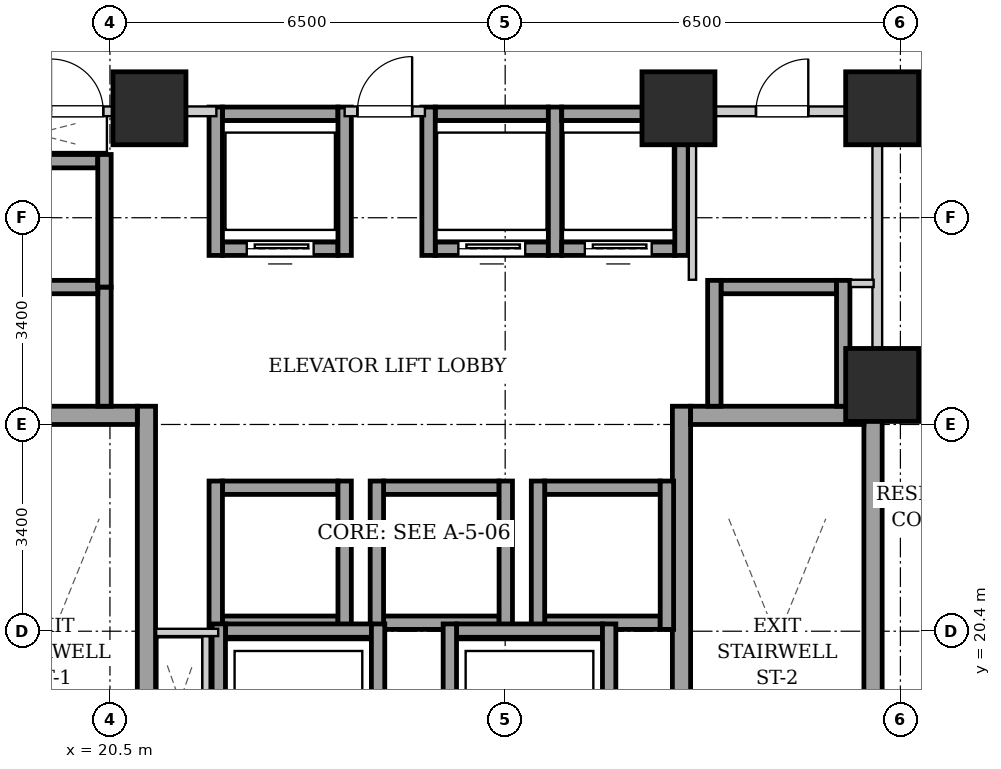
"""IFC4 building model, lengths in metres.
Left out: names, types, materials, properties, quantities, classifications, styles, units other than length and angle.
Written with IfcOpenShell. Run it as: python <this file> out.ifc"""

import sys

from ifc_helpers import new_model, si_unit, direction, frame, frame_2d, origin, origin_2d, place, context, subcontext, project, spatial, rectangle, extrude, element, fill, save


model = new_model("IFC4")
c1 = context("Model", 3, precision=1e-05, world=origin(), true_north=direction((0.0, 1.0)))
c2 = subcontext(c1, "Body", "Model", "MODEL_VIEW")
j1 = project(units=[si_unit("LENGTHUNIT", "METRE"), si_unit("PLANEANGLEUNIT", "RADIAN")], contexts=[c1])
p1 = place(None, origin())
s1 = spatial("IfcSite", under=j1, at=p1, CompositionType="ELEMENT")
p2 = place(p1, origin())
s2 = spatial("IfcBuilding", under=s1, at=p2, CompositionType="ELEMENT")
p3 = place(p2, frame((0.0, 0.0, 25.8)))
s3 = spatial("IfcBuildingStorey", under=s2, at=p3, CompositionType="ELEMENT", Elevation=25.8)
for number, where, z_axis, x_axis in (
    (1, (21.15, 29.0, 0.0), (0.0, 0.0, 1.0), (1.0, 0.0, 0.0)),
    (2, (29.85, 29.0, 0.0), (0.0, 0.0, 1.0), (1.0, 0.0, 0.0)),
    (3, (33.2, 29.0, 0.0), (0.0, 0.0, 1.0), (1.0, 0.0, 0.0)),
    (4, (33.2, 24.45, 0.0), (0.0, 0.0, 1.0), (1.0, 0.0, 0.0)),
):
    element("IfcColumn", number, at=place(p3, frame(where, z_axis=z_axis, x_axis=x_axis)), inside=s3, PredefinedType="COLUMN", context=c2, shape_type="SweptSolid", body=[
        extrude(rectangle(XDim=1.2, YDim=1.2, at=origin_2d()), origin(), (0.0, 0.0, 1.0), 3.2),
    ])
p4 = place(p3, frame((21.1, 15.1, 0.0), z_axis=(0.0, 0.0, 1.0), x_axis=(0.0, 1.0, 0.0)))
e5 = element("IfcWall", 5, at=p4, inside=s3, PredefinedType="SHEAR", context=c2, shape_type="SweptSolid", body=[
    extrude(rectangle(XDim=9.0, YDim=0.3, at=frame_2d((4.5, 0.0))), origin(), (0.0, 0.0, 1.0), 2.94),
])
p5 = place(p3, frame((18.1, 23.95, 0.0), z_axis=(0.0, 0.0, 1.0), x_axis=(1.0, 0.0, 0.0)))
e6 = element("IfcWall", 6, at=p5, inside=s3, PredefinedType="SHEAR", context=c2, shape_type="SweptSolid", body=[
    extrude(rectangle(XDim=2.85, YDim=0.3, at=frame_2d((1.425, 0.0))), origin(), (0.0, 0.0, 1.0), 2.94),
])
for number, where, z_axis, x_axis in (
    (7, (29.9, 15.1, 0.0), (0.0, 0.0, 1.0), (0.0, 1.0, 0.0)),
    (8, (33.05, 15.1, 0.0), (0.0, 0.0, 1.0), (0.0, 1.0, 0.0)),
):
    element("IfcWall", number, at=place(p3, frame(where, z_axis=z_axis, x_axis=x_axis)), inside=s3, PredefinedType="SHEAR", context=c2, shape_type="SweptSolid", body=[
        extrude(rectangle(XDim=9.0, YDim=0.3, at=frame_2d((4.5, 0.0))), origin(), (0.0, 0.0, 1.0), 2.94),
    ])
p6 = place(p3, frame((30.05, 23.95, 0.0), z_axis=(0.0, 0.0, 1.0), x_axis=(1.0, 0.0, 0.0)))
e9 = element("IfcWall", 9, at=p6, inside=s3, PredefinedType="SHEAR", context=c2, shape_type="SweptSolid", body=[
    extrude(rectangle(XDim=2.85, YDim=0.3, at=frame_2d((1.425, 0.0))), origin(), (0.0, 0.0, 1.0), 2.94),
])
p7 = place(p3, frame((22.35, 26.69, 0.0), z_axis=(0.0, 0.0, 1.0), x_axis=(1.0, 0.0, 0.0)))
e10 = element("IfcWall", 10, at=p7, inside=s3, PredefinedType="SHEAR", context=c2, shape_type="SweptSolid", body=[
    extrude(rectangle(XDim=1.9, YDim=0.22, at=frame_2d((0.95, 0.0))), origin(), (0.0, 0.0, 1.0), 2.94),
])
p8 = place(p7, frame((0.4, 0.0, 0.0)))
e11 = element("IfcOpeningElement", 11, at=p8, cuts=e10, PredefinedType="OPENING", context=c2, shape_type="SweptSolid", body=[
    extrude(rectangle(XDim=1.1, YDim=2.15, at=frame_2d((0.55, 1.075))), frame((0.0, 0.12, 0.0), z_axis=(0.0, -1.0, 0.0), x_axis=(1.0, 0.0, 0.0)), (0.0, 0.0, 1.0), 0.24),
])
p9 = place(p3, frame((22.35, 28.91, 0.0), z_axis=(0.0, 0.0, 1.0), x_axis=(1.0, 0.0, 0.0)))
e12 = element("IfcWall", 12, at=p9, inside=s3, PredefinedType="SHEAR", context=c2, shape_type="SweptSolid", body=[
    extrude(rectangle(XDim=1.9, YDim=0.22, at=frame_2d((0.95, 0.0))), origin(), (0.0, 0.0, 1.0), 2.94),
])
for number, where, z_axis, x_axis in (
    (13, (22.24, 26.58, 0.0), (0.0, 0.0, 1.0), (0.0, 1.0, 0.0)),
    (14, (24.36, 26.58, 0.0), (0.0, 0.0, 1.0), (0.0, 1.0, 0.0)),
):
    element("IfcWall", number, at=place(p3, frame(where, z_axis=z_axis, x_axis=x_axis)), inside=s3, PredefinedType="SHEAR", context=c2, shape_type="SweptSolid", body=[
        extrude(rectangle(XDim=2.44, YDim=0.22, at=frame_2d((1.22, 0.0))), origin(), (0.0, 0.0, 1.0), 2.94),
    ])
p10 = place(p3, frame((25.85, 26.69, 0.0), z_axis=(0.0, 0.0, 1.0), x_axis=(1.0, 0.0, 0.0)))
e15 = element("IfcWall", 15, at=p10, inside=s3, PredefinedType="SHEAR", context=c2, shape_type="SweptSolid", body=[
    extrude(rectangle(XDim=1.86, YDim=0.22, at=frame_2d((0.93, 0.0))), origin(), (0.0, 0.0, 1.0), 2.94),
])
p11 = place(p10, frame((0.38, 0.0, 0.0)))
e16 = element("IfcOpeningElement", 16, at=p11, cuts=e15, PredefinedType="OPENING", context=c2, shape_type="SweptSolid", body=[
    extrude(rectangle(XDim=1.1, YDim=2.15, at=frame_2d((0.55, 1.075))), frame((0.0, 0.12, 0.0), z_axis=(0.0, -1.0, 0.0), x_axis=(1.0, 0.0, 0.0)), (0.0, 0.0, 1.0), 0.24),
])
p12 = place(p3, frame((25.85, 28.91, 0.0), z_axis=(0.0, 0.0, 1.0), x_axis=(1.0, 0.0, 0.0)))
e17 = element("IfcWall", 17, at=p12, inside=s3, PredefinedType="SHEAR", context=c2, shape_type="SweptSolid", body=[
    extrude(rectangle(XDim=1.86, YDim=0.22, at=frame_2d((0.93, 0.0))), origin(), (0.0, 0.0, 1.0), 2.94),
])
for number, where, z_axis, x_axis in (
    (18, (25.74, 26.58, 0.0), (0.0, 0.0, 1.0), (0.0, 1.0, 0.0)),
    (19, (27.82, 26.58, 0.0), (0.0, 0.0, 1.0), (0.0, 1.0, 0.0)),
):
    element("IfcWall", number, at=place(p3, frame(where, z_axis=z_axis, x_axis=x_axis)), inside=s3, PredefinedType="SHEAR", context=c2, shape_type="SweptSolid", body=[
        extrude(rectangle(XDim=2.44, YDim=0.22, at=frame_2d((1.22, 0.0))), origin(), (0.0, 0.0, 1.0), 2.94),
    ])
p13 = place(p3, frame((27.93, 26.69, 0.0), z_axis=(0.0, 0.0, 1.0), x_axis=(1.0, 0.0, 0.0)))
e20 = element("IfcWall", 20, at=p13, inside=s3, PredefinedType="SHEAR", context=c2, shape_type="SweptSolid", body=[
    extrude(rectangle(XDim=1.86, YDim=0.22, at=frame_2d((0.93, 0.0))), origin(), (0.0, 0.0, 1.0), 2.94),
])
p14 = place(p13, frame((0.38, 0.0, 0.0)))
e21 = element("IfcOpeningElement", 21, at=p14, cuts=e20, PredefinedType="OPENING", context=c2, shape_type="SweptSolid", body=[
    extrude(rectangle(XDim=1.1, YDim=2.15, at=frame_2d((0.55, 1.075))), frame((0.0, 0.12, 0.0), z_axis=(0.0, -1.0, 0.0), x_axis=(1.0, 0.0, 0.0)), (0.0, 0.0, 1.0), 0.24),
])
p15 = place(p3, frame((27.93, 28.91, 0.0), z_axis=(0.0, 0.0, 1.0), x_axis=(1.0, 0.0, 0.0)))
e22 = element("IfcWall", 22, at=p15, inside=s3, PredefinedType="SHEAR", context=c2, shape_type="SweptSolid", body=[
    extrude(rectangle(XDim=1.86, YDim=0.22, at=frame_2d((0.93, 0.0))), origin(), (0.0, 0.0, 1.0), 2.94),
])
p16 = place(p3, frame((29.9, 26.58, 0.0), z_axis=(0.0, 0.0, 1.0), x_axis=(0.0, 1.0, 0.0)))
e23 = element("IfcWall", 23, at=p16, inside=s3, PredefinedType="SHEAR", context=c2, shape_type="SweptSolid", body=[
    extrude(rectangle(XDim=2.44, YDim=0.22, at=frame_2d((1.22, 0.0))), origin(), (0.0, 0.0, 1.0), 2.94),
])
for number, where, z_axis, x_axis in (
    (24, (22.35, 20.54, 0.0), (0.0, 0.0, 1.0), (1.0, 0.0, 0.0)),
    (25, (22.35, 22.76, 0.0), (0.0, 0.0, 1.0), (1.0, 0.0, 0.0)),
):
    element("IfcWall", number, at=place(p3, frame(where, z_axis=z_axis, x_axis=x_axis)), inside=s3, PredefinedType="SHEAR", context=c2, shape_type="SweptSolid", body=[
        extrude(rectangle(XDim=1.9, YDim=0.22, at=frame_2d((0.95, 0.0))), origin(), (0.0, 0.0, 1.0), 2.94),
    ])
for number, where, z_axis, x_axis in (
    (26, (22.24, 20.43, 0.0), (0.0, 0.0, 1.0), (0.0, 1.0, 0.0)),
    (27, (24.36, 20.43, 0.0), (0.0, 0.0, 1.0), (0.0, 1.0, 0.0)),
):
    element("IfcWall", number, at=place(p3, frame(where, z_axis=z_axis, x_axis=x_axis)), inside=s3, PredefinedType="SHEAR", context=c2, shape_type="SweptSolid", body=[
        extrude(rectangle(XDim=2.44, YDim=0.22, at=frame_2d((1.22, 0.0))), origin(), (0.0, 0.0, 1.0), 2.94),
    ])
for number, where, z_axis, x_axis in (
    (28, (25.0, 20.54, 0.0), (0.0, 0.0, 1.0), (1.0, 0.0, 0.0)),
    (29, (25.0, 22.76, 0.0), (0.0, 0.0, 1.0), (1.0, 0.0, 0.0)),
):
    element("IfcWall", number, at=place(p3, frame(where, z_axis=z_axis, x_axis=x_axis)), inside=s3, PredefinedType="SHEAR", context=c2, shape_type="SweptSolid", body=[
        extrude(rectangle(XDim=1.9, YDim=0.22, at=frame_2d((0.95, 0.0))), origin(), (0.0, 0.0, 1.0), 2.94),
    ])
for number, where, z_axis, x_axis in (
    (30, (24.89, 20.43, 0.0), (0.0, 0.0, 1.0), (0.0, 1.0, 0.0)),
    (31, (27.01, 20.43, 0.0), (0.0, 0.0, 1.0), (0.0, 1.0, 0.0)),
):
    element("IfcWall", number, at=place(p3, frame(where, z_axis=z_axis, x_axis=x_axis)), inside=s3, PredefinedType="SHEAR", context=c2, shape_type="SweptSolid", body=[
        extrude(rectangle(XDim=2.44, YDim=0.22, at=frame_2d((1.22, 0.0))), origin(), (0.0, 0.0, 1.0), 2.94),
    ])
for number, where, z_axis, x_axis in (
    (32, (27.65, 20.54, 0.0), (0.0, 0.0, 1.0), (1.0, 0.0, 0.0)),
    (33, (27.65, 22.76, 0.0), (0.0, 0.0, 1.0), (1.0, 0.0, 0.0)),
):
    element("IfcWall", number, at=place(p3, frame(where, z_axis=z_axis, x_axis=x_axis)), inside=s3, PredefinedType="SHEAR", context=c2, shape_type="SweptSolid", body=[
        extrude(rectangle(XDim=1.9, YDim=0.22, at=frame_2d((0.95, 0.0))), origin(), (0.0, 0.0, 1.0), 2.94),
    ])
for number, where, z_axis, x_axis in (
    (34, (27.54, 20.43, 0.0), (0.0, 0.0, 1.0), (0.0, 1.0, 0.0)),
    (35, (29.66, 20.43, 0.0), (0.0, 0.0, 1.0), (0.0, 1.0, 0.0)),
):
    element("IfcWall", number, at=place(p3, frame(where, z_axis=z_axis, x_axis=x_axis)), inside=s3, PredefinedType="SHEAR", context=c2, shape_type="SweptSolid", body=[
        extrude(rectangle(XDim=2.44, YDim=0.22, at=frame_2d((1.22, 0.0))), origin(), (0.0, 0.0, 1.0), 2.94),
    ])
p17 = place(p3, frame((20.41, 24.1, 0.0), z_axis=(0.0, 0.0, 1.0), x_axis=(0.0, 1.0, 0.0)))
e36 = element("IfcWall", 36, at=p17, inside=s3, PredefinedType="SHEAR", context=c2, shape_type="SweptSolid", body=[
    extrude(rectangle(XDim=1.96, YDim=0.22, at=frame_2d((0.98, 0.0))), origin(), (0.0, 0.0, 1.0), 2.94),
])
for number, where, z_axis, x_axis in (
    (37, (18.4, 26.06, 0.0), (0.0, 0.0, 1.0), (1.0, 0.0, 0.0)),
    (38, (18.4, 28.13, 0.0), (0.0, 0.0, 1.0), (1.0, 0.0, 0.0)),
):
    element("IfcWall", number, at=place(p3, frame(where, z_axis=z_axis, x_axis=x_axis)), inside=s3, PredefinedType="SHEAR", context=c2, shape_type="SweptSolid", body=[
        extrude(rectangle(XDim=1.9, YDim=0.22, at=frame_2d((0.95, 0.0))), origin(), (0.0, 0.0, 1.0), 2.94),
    ])
p18 = place(p3, frame((20.41, 26.06, 0.0), z_axis=(0.0, 0.0, 1.0), x_axis=(0.0, 1.0, 0.0)))
e39 = element("IfcWall", 39, at=p18, inside=s3, PredefinedType="SHEAR", context=c2, shape_type="SweptSolid", body=[
    extrude(rectangle(XDim=2.18, YDim=0.22, at=frame_2d((1.09, 0.0))), origin(), (0.0, 0.0, 1.0), 2.94),
])
p19 = place(p3, frame((30.55, 26.06, 0.0), z_axis=(0.0, 0.0, 1.0), x_axis=(1.0, 0.0, 0.0)))
e40 = element("IfcWall", 40, at=p19, inside=s3, PredefinedType="SHEAR", context=c2, shape_type="SweptSolid", body=[
    extrude(rectangle(XDim=1.9, YDim=0.22, at=frame_2d((0.95, 0.0))), origin(), (0.0, 0.0, 1.0), 2.94),
])
for number, where, z_axis, x_axis in (
    (41, (30.44, 24.1, 0.0), (0.0, 0.0, 1.0), (0.0, 1.0, 0.0)),
    (42, (32.56, 24.1, 0.0), (0.0, 0.0, 1.0), (0.0, 1.0, 0.0)),
):
    element("IfcWall", number, at=place(p3, frame(where, z_axis=z_axis, x_axis=x_axis)), inside=s3, PredefinedType="SHEAR", context=c2, shape_type="SweptSolid", body=[
        extrude(rectangle(XDim=2.07, YDim=0.22, at=frame_2d((1.035, 0.0))), origin(), (0.0, 0.0, 1.0), 2.94),
    ])
p20 = place(p3, frame((22.4, 20.41, 0.0), z_axis=(0.0, 0.0, 1.0), x_axis=(1.0, 0.0, 0.0)))
e43 = element("IfcWall", 43, at=p20, inside=s3, PredefinedType="SHEAR", context=c2, shape_type="SweptSolid", body=[
    extrude(rectangle(XDim=2.4, YDim=0.22, at=frame_2d((1.2, 0.0))), origin(), (0.0, 0.0, 1.0), 2.94),
])
for number, where, z_axis, x_axis in (
    (44, (22.29, 17.98, 0.0), (0.0, 0.0, 1.0), (0.0, 1.0, 0.0)),
    (45, (24.91, 17.98, 0.0), (0.0, 0.0, 1.0), (0.0, 1.0, 0.0)),
):
    element("IfcWall", number, at=place(p3, frame(where, z_axis=z_axis, x_axis=x_axis)), inside=s3, PredefinedType="SHEAR", context=c2, shape_type="SweptSolid", body=[
        extrude(rectangle(XDim=2.54, YDim=0.22, at=frame_2d((1.27, 0.0))), origin(), (0.0, 0.0, 1.0), 2.94),
    ])
p21 = place(p3, frame((26.2, 20.41, 0.0), z_axis=(0.0, 0.0, 1.0), x_axis=(1.0, 0.0, 0.0)))
e46 = element("IfcWall", 46, at=p21, inside=s3, PredefinedType="SHEAR", context=c2, shape_type="SweptSolid", body=[
    extrude(rectangle(XDim=2.4, YDim=0.22, at=frame_2d((1.2, 0.0))), origin(), (0.0, 0.0, 1.0), 2.94),
])
for number, where, z_axis, x_axis in (
    (47, (26.09, 17.98, 0.0), (0.0, 0.0, 1.0), (0.0, 1.0, 0.0)),
    (48, (28.71, 17.98, 0.0), (0.0, 0.0, 1.0), (0.0, 1.0, 0.0)),
):
    element("IfcWall", number, at=place(p3, frame(where, z_axis=z_axis, x_axis=x_axis)), inside=s3, PredefinedType="SHEAR", context=c2, shape_type="SweptSolid", body=[
        extrude(rectangle(XDim=2.54, YDim=0.22, at=frame_2d((1.27, 0.0))), origin(), (0.0, 0.0, 1.0), 2.94),
    ])
p22 = place(p3, frame((33.12, 24.12, 0.0), z_axis=(0.0, 0.0, 1.0), x_axis=(0.0, 1.0, 0.0)))
e49 = element("IfcWall", 49, at=p22, inside=s3, PredefinedType="PARTITIONING", context=c2, shape_type="SweptSolid", body=[
    extrude(rectangle(XDim=4.76, YDim=0.16, at=frame_2d((2.38, 0.0))), origin(), (0.0, 0.0, 1.0), 2.94),
])
p23 = place(p3, frame((24.36, 28.95, 0.0), z_axis=(0.0, 0.0, 1.0), x_axis=(1.0, 0.0, 0.0)))
e50 = element("IfcWall", 50, at=p23, inside=s3, PredefinedType="PARTITIONING", context=c2, shape_type="SweptSolid", body=[
    extrude(rectangle(XDim=1.32, YDim=0.16, at=frame_2d((0.66, 0.0))), origin(), (0.0, 0.0, 1.0), 2.155),
])
p24 = place(p23, frame((0.21, 0.0, 0.0)))
e51 = element("IfcOpeningElement", 51, at=p24, cuts=e50, PredefinedType="OPENING", context=c2, shape_type="SweptSolid", body=[
    extrude(rectangle(XDim=0.9, YDim=2.05, at=frame_2d((0.45, 1.025))), frame((0.0, 0.09, 0.0), z_axis=(0.0, -1.0, 0.0), x_axis=(1.0, 0.0, 0.0)), (0.0, 0.0, 1.0), 0.18),
])
p25 = place(p3, frame((17.96, 28.95, 0.0), z_axis=(0.0, 0.0, 1.0), x_axis=(1.0, 0.0, 0.0)))
e52 = element("IfcWall", 52, at=p25, inside=s3, PredefinedType="PARTITIONING", context=c2, shape_type="SweptSolid", body=[
    extrude(rectangle(XDim=4.29, YDim=0.16, at=frame_2d((2.145, 0.0))), origin(), (0.0, 0.0, 1.0), 2.155),
])
p26 = place(p25, frame((1.57, 0.0, 0.0)))
e53 = element("IfcOpeningElement", 53, at=p26, cuts=e52, PredefinedType="OPENING", context=c2, shape_type="SweptSolid", body=[
    extrude(rectangle(XDim=0.86, YDim=2.05, at=frame_2d((0.43, 1.025))), frame((0.0, 0.09, 0.0), z_axis=(0.0, -1.0, 0.0), x_axis=(1.0, 0.0, 0.0)), (0.0, 0.0, 1.0), 0.18),
])
p27 = place(p3, frame((22.08, 18.2, 0.0), z_axis=(0.0, 0.0, 1.0), x_axis=(0.0, 1.0, 0.0)))
e54 = element("IfcWall", 54, at=p27, inside=s3, PredefinedType="PARTITIONING", context=c2, shape_type="SweptSolid", body=[
    extrude(rectangle(XDim=2.12, YDim=0.12, at=frame_2d((1.06, 0.0))), origin(), (0.0, 0.0, 1.0), 2.94),
])
p28 = place(p3, frame((22.28, 20.38, 0.0), z_axis=(0.0, 0.0, 1.0), x_axis=(-1.0, 0.0, 0.0)))
e55 = element("IfcWall", 55, at=p28, inside=s3, PredefinedType="PARTITIONING", context=c2, shape_type="SweptSolid", body=[
    extrude(rectangle(XDim=1.02, YDim=0.12, at=frame_2d((0.51, 0.0))), origin(), (0.0, 0.0, 1.0), 2.94),
])
p29 = place(p3, frame((30.08, 26.18, 0.0), z_axis=(0.0, 0.0, 1.0), x_axis=(0.0, 1.0, 0.0)))
e56 = element("IfcWall", 56, at=p29, inside=s3, PredefinedType="PARTITIONING", context=c2, shape_type="SweptSolid", body=[
    extrude(rectangle(XDim=2.68, YDim=0.12, at=frame_2d((1.34, 0.0))), origin(), (0.0, 0.0, 1.0), 2.94),
])
p30 = place(p3, frame((32.68, 26.12, 0.0), z_axis=(0.0, 0.0, 1.0), x_axis=(1.0, 0.0, 0.0)))
e57 = element("IfcWall", 57, at=p30, inside=s3, PredefinedType="PARTITIONING", context=c2, shape_type="SweptSolid", body=[
    extrude(rectangle(XDim=0.38, YDim=0.12, at=frame_2d((0.19, 0.0))), origin(), (0.0, 0.0, 1.0), 2.94),
])
p31 = place(p3, frame((30.08, 28.95, 0.0), z_axis=(0.0, 0.0, 1.0), x_axis=(1.0, 0.0, 0.0)))
e58 = element("IfcWall", 58, at=p31, inside=s3, PredefinedType="PARTITIONING", context=c2, shape_type="SweptSolid", body=[
    extrude(rectangle(XDim=2.96, YDim=0.16, at=frame_2d((1.48, 0.0))), origin(), (0.0, 0.0, 1.0), 2.94),
])
p32 = place(p31, frame((1.045, 0.0, 0.0)))
e59 = element("IfcOpeningElement", 59, at=p32, cuts=e58, PredefinedType="OPENING", context=c2, shape_type="SweptSolid", body=[
    extrude(rectangle(XDim=0.86, YDim=2.05, at=frame_2d((0.43, 1.025))), frame((0.0, 0.09, 0.0), z_axis=(0.0, -1.0, 0.0), x_axis=(1.0, 0.0, 0.0)), (0.0, 0.0, 1.0), 0.18),
])
p33 = place(p8, origin())
e60 = element("IfcDoor", 60, at=p33, inside=s3, OperationType="SLIDING_TO_LEFT", PredefinedType="DOOR", context=c2, shape_type="SweptSolid", body=[
    extrude(rectangle(XDim=1.1, YDim=2.15, at=frame_2d((0.55, 1.075))), frame((0.0, 0.025, 0.0), z_axis=(0.0, -1.0, 0.0), x_axis=(1.0, 0.0, 0.0)), (0.0, 0.0, 1.0), 0.05),
])
fill(e11, e60)
p34 = place(p11, origin())
e61 = element("IfcDoor", 61, at=p34, inside=s3, OperationType="SLIDING_TO_LEFT", PredefinedType="DOOR", context=c2, shape_type="SweptSolid", body=[
    extrude(rectangle(XDim=1.1, YDim=2.15, at=frame_2d((0.55, 1.075))), frame((0.0, 0.025, 0.0), z_axis=(0.0, -1.0, 0.0), x_axis=(1.0, 0.0, 0.0)), (0.0, 0.0, 1.0), 0.05),
])
fill(e16, e61)
p35 = place(p14, origin())
e62 = element("IfcDoor", 62, at=p35, inside=s3, OperationType="SLIDING_TO_LEFT", PredefinedType="DOOR", context=c2, shape_type="SweptSolid", body=[
    extrude(rectangle(XDim=1.1, YDim=2.15, at=frame_2d((0.55, 1.075))), frame((0.0, 0.025, 0.0), z_axis=(0.0, -1.0, 0.0), x_axis=(1.0, 0.0, 0.0)), (0.0, 0.0, 1.0), 0.05),
])
fill(e21, e62)
p36 = place(p24, origin())
e63 = element("IfcDoor", 63, at=p36, inside=s3, OperationType="SINGLE_SWING_RIGHT", PredefinedType="DOOR", context=c2, shape_type="SweptSolid", body=[
    extrude(rectangle(XDim=0.9, YDim=2.05, at=frame_2d((0.45, 1.025))), frame((0.0, 0.025, 0.0), z_axis=(0.0, -1.0, 0.0), x_axis=(1.0, 0.0, 0.0)), (0.0, 0.0, 1.0), 0.05),
])
fill(e51, e63)
p37 = place(p26, origin())
e64 = element("IfcDoor", 64, at=p37, inside=s3, OperationType="SINGLE_SWING_LEFT", PredefinedType="DOOR", context=c2, shape_type="SweptSolid", body=[
    extrude(rectangle(XDim=0.86, YDim=2.05, at=frame_2d((0.43, 1.025))), frame((0.0, 0.025, 0.0), z_axis=(0.0, -1.0, 0.0), x_axis=(1.0, 0.0, 0.0)), (0.0, 0.0, 1.0), 0.05),
])
fill(e53, e64)
p38 = place(p32, origin())
e65 = element("IfcDoor", 65, at=p38, inside=s3, OperationType="SINGLE_SWING_RIGHT", PredefinedType="DOOR", context=c2, shape_type="SweptSolid", body=[
    extrude(rectangle(XDim=0.86, YDim=2.05, at=frame_2d((0.43, 1.025))), frame((0.0, 0.025, 0.0), z_axis=(0.0, -1.0, 0.0), x_axis=(1.0, 0.0, 0.0)), (0.0, 0.0, 1.0), 0.05),
])
fill(e59, e65)
save(model, sys.argv[1])
